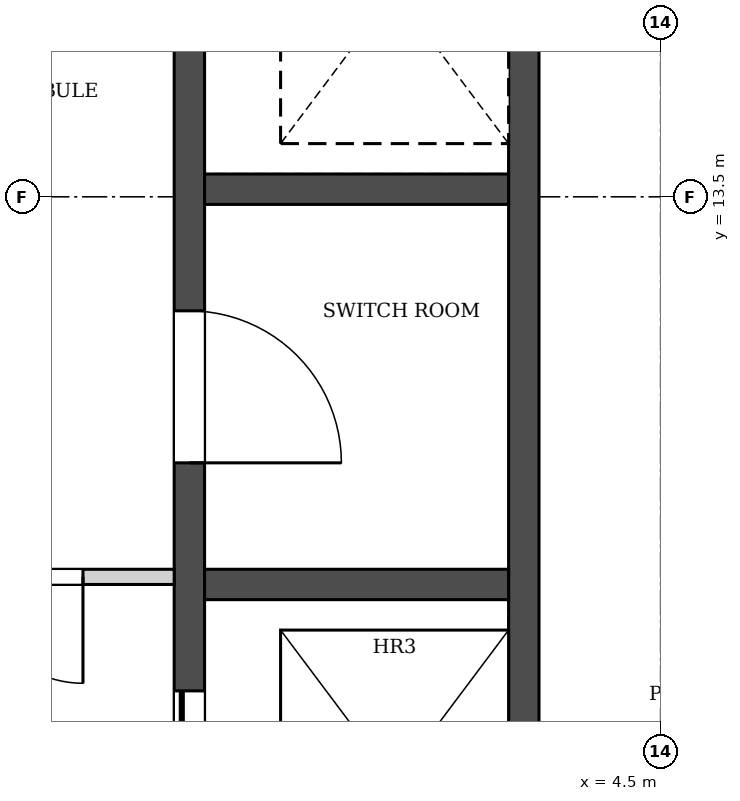
"""IFC4 building model, lengths in metres.
Left out: names, types, materials, properties, quantities, classifications, styles, units other than length and angle.
Written with IfcOpenShell. Run it as: python <this file> out.ifc"""

import sys

from ifc_helpers import new_model, si_unit, direction, frame, frame_2d, origin, place, context, subcontext, project, spatial, rectangle, extrude, element, fill, save


model = new_model("IFC4")
c1 = context("Model", 3, precision=1e-05, world=origin(), true_north=direction((0.0, 1.0)))
c2 = subcontext(c1, "Body", "Model", "MODEL_VIEW")
j1 = project(units=[si_unit("LENGTHUNIT", "METRE"), si_unit("PLANEANGLEUNIT", "RADIAN")], contexts=[c1])
p1 = place(None, origin())
s1 = spatial("IfcSite", under=j1, at=p1, CompositionType="ELEMENT")
p2 = place(p1, origin())
s2 = spatial("IfcBuilding", under=s1, at=p2, CompositionType="ELEMENT")
p3 = place(p2, frame((0.0, 0.0, 304.5)))
s3 = spatial("IfcBuildingStorey", under=s2, at=p3, CompositionType="ELEMENT", Elevation=304.5)
p4 = place(p3, frame((24.905, 7.709, 0.0), z_axis=(0.0, 0.0, 1.0), x_axis=(-0.50000128873, 0.866024659735, 0.0)))
e1 = element("IfcWall", 1, at=p4, inside=s3, PredefinedType="SOLIDWALL", context=c2, shape_type="SweptSolid", body=[
    extrude(rectangle(XDim=41.104, YDim=0.34, at=frame_2d((20.552, 0.0))), origin(), (0.0, 0.0, 1.0), 5.0),
])
p5 = place(p4, frame((3.776, 0.0, 0.9)))
e2 = element("IfcOpeningElement", 2, at=p5, cuts=e1, PredefinedType="OPENING", context=c2, shape_type="SweptSolid", body=[
    extrude(rectangle(XDim=1.885, YDim=3.0, at=frame_2d((0.942, 1.5))), frame((0.0, 0.18, 0.0), z_axis=(0.0, -1.0, 0.0), x_axis=(1.0, 0.0, 0.0)), (0.0, 0.0, 1.0), 0.36),
])
p6 = place(p4, frame((6.776, 0.0, 0.9)))
e3 = element("IfcOpeningElement", 3, at=p6, cuts=e1, PredefinedType="OPENING", context=c2, shape_type="SweptSolid", body=[
    extrude(rectangle(XDim=1.885, YDim=3.0, at=frame_2d((0.942, 1.5))), frame((0.0, 0.18, 0.0), z_axis=(0.0, -1.0, 0.0), x_axis=(1.0, 0.0, 0.0)), (0.0, 0.0, 1.0), 0.36),
])
p7 = place(p4, frame((9.776, 0.0, 0.9)))
e4 = element("IfcOpeningElement", 4, at=p7, cuts=e1, PredefinedType="OPENING", context=c2, shape_type="SweptSolid", body=[
    extrude(rectangle(XDim=1.885, YDim=3.0, at=frame_2d((0.942, 1.5))), frame((0.0, 0.18, 0.0), z_axis=(0.0, -1.0, 0.0), x_axis=(1.0, 0.0, 0.0)), (0.0, 0.0, 1.0), 0.36),
])
p8 = place(p4, frame((12.776, 0.0, 0.9)))
e5 = element("IfcOpeningElement", 5, at=p8, cuts=e1, PredefinedType="OPENING", context=c2, shape_type="SweptSolid", body=[
    extrude(rectangle(XDim=1.885, YDim=3.0, at=frame_2d((0.942, 1.5))), frame((0.0, 0.18, 0.0), z_axis=(0.0, -1.0, 0.0), x_axis=(1.0, 0.0, 0.0)), (0.0, 0.0, 1.0), 0.36),
])
p9 = place(p4, frame((15.776, 0.0, 0.9)))
e6 = element("IfcOpeningElement", 6, at=p9, cuts=e1, PredefinedType="OPENING", context=c2, shape_type="SweptSolid", body=[
    extrude(rectangle(XDim=1.885, YDim=3.0, at=frame_2d((0.942, 1.5))), frame((0.0, 0.18, 0.0), z_axis=(0.0, -1.0, 0.0), x_axis=(1.0, 0.0, 0.0)), (0.0, 0.0, 1.0), 0.36),
])
p10 = place(p4, frame((18.776, 0.0, 0.9)))
e7 = element("IfcOpeningElement", 7, at=p10, cuts=e1, PredefinedType="OPENING", context=c2, shape_type="SweptSolid", body=[
    extrude(rectangle(XDim=1.885, YDim=3.0, at=frame_2d((0.942, 1.5))), frame((0.0, 0.18, 0.0), z_axis=(0.0, -1.0, 0.0), x_axis=(1.0, 0.0, 0.0)), (0.0, 0.0, 1.0), 0.36),
])
p11 = place(p4, frame((21.776, 0.0, 0.9)))
e8 = element("IfcOpeningElement", 8, at=p11, cuts=e1, PredefinedType="OPENING", context=c2, shape_type="SweptSolid", body=[
    extrude(rectangle(XDim=1.885, YDim=3.0, at=frame_2d((0.942, 1.5))), frame((0.0, 0.18, 0.0), z_axis=(0.0, -1.0, 0.0), x_axis=(1.0, 0.0, 0.0)), (0.0, 0.0, 1.0), 0.36),
])
p12 = place(p4, frame((24.776, 0.0, 0.9)))
e9 = element("IfcOpeningElement", 9, at=p12, cuts=e1, PredefinedType="OPENING", context=c2, shape_type="SweptSolid", body=[
    extrude(rectangle(XDim=1.885, YDim=3.0, at=frame_2d((0.942, 1.5))), frame((0.0, 0.18, 0.0), z_axis=(0.0, -1.0, 0.0), x_axis=(1.0, 0.0, 0.0)), (0.0, 0.0, 1.0), 0.36),
])
p13 = place(p4, frame((27.776, 0.0, 0.9)))
e10 = element("IfcOpeningElement", 10, at=p13, cuts=e1, PredefinedType="OPENING", context=c2, shape_type="SweptSolid", body=[
    extrude(rectangle(XDim=1.885, YDim=3.0, at=frame_2d((0.942, 1.5))), frame((0.0, 0.18, 0.0), z_axis=(0.0, -1.0, 0.0), x_axis=(1.0, 0.0, 0.0)), (0.0, 0.0, 1.0), 0.36),
])
p14 = place(p4, frame((30.776, 0.0, 0.9)))
e11 = element("IfcOpeningElement", 11, at=p14, cuts=e1, PredefinedType="OPENING", context=c2, shape_type="SweptSolid", body=[
    extrude(rectangle(XDim=1.885, YDim=3.0, at=frame_2d((0.942, 1.5))), frame((0.0, 0.18, 0.0), z_axis=(0.0, -1.0, 0.0), x_axis=(1.0, 0.0, 0.0)), (0.0, 0.0, 1.0), 0.36),
])
p15 = place(p4, frame((33.776, 0.0, 0.9)))
e12 = element("IfcOpeningElement", 12, at=p15, cuts=e1, PredefinedType="OPENING", context=c2, shape_type="SweptSolid", body=[
    extrude(rectangle(XDim=1.885, YDim=3.0, at=frame_2d((0.942, 1.5))), frame((0.0, 0.18, 0.0), z_axis=(0.0, -1.0, 0.0), x_axis=(1.0, 0.0, 0.0)), (0.0, 0.0, 1.0), 0.36),
])
p16 = place(p4, frame((36.776, 0.0, 0.9)))
e13 = element("IfcOpeningElement", 13, at=p16, cuts=e1, PredefinedType="OPENING", context=c2, shape_type="SweptSolid", body=[
    extrude(rectangle(XDim=1.885, YDim=3.0, at=frame_2d((0.942, 1.5))), frame((0.0, 0.18, 0.0), z_axis=(0.0, -1.0, 0.0), x_axis=(1.0, 0.0, 0.0)), (0.0, 0.0, 1.0), 0.36),
])
p17 = place(p3, frame((3.6, 8.45, -0.4), z_axis=(0.0, 0.0, 1.0), x_axis=(0.0, 1.0, 0.0)))
e14 = element("IfcWall", 14, at=p17, inside=s3, PredefinedType="SOLIDWALL", context=c2, shape_type="SweptSolid", body=[
    extrude(rectangle(XDim=7.8, YDim=0.2, at=frame_2d((3.9, 0.0))), origin(), (0.0, 0.0, 1.0), 5.4),
])
p18 = place(p3, frame((1.4, 5.85, -0.4), z_axis=(0.0, 0.0, 1.0), x_axis=(0.0, 1.0, 0.0)))
e15 = element("IfcWall", 15, at=p18, inside=s3, PredefinedType="SOLIDWALL", context=c2, shape_type="SweptSolid", body=[
    extrude(rectangle(XDim=11.75, YDim=0.2, at=frame_2d((5.875, 0.0))), origin(), (0.0, 0.0, 1.0), 5.4),
])
p19 = place(p18, frame((3.2, 0.0, 0.4)))
e16 = element("IfcOpeningElement", 16, at=p19, cuts=e15, PredefinedType="OPENING", context=c2, shape_type="SweptSolid", body=[
    extrude(rectangle(XDim=1.2, YDim=2.1, at=frame_2d((0.6, 1.05))), frame((0.0, 0.11, 0.0), z_axis=(0.0, -1.0, 0.0), x_axis=(1.0, 0.0, 0.0)), (0.0, 0.0, 1.0), 0.22),
])
p20 = place(p18, frame((0.65, 0.0, 0.4)))
e17 = element("IfcOpeningElement", 17, at=p20, cuts=e15, PredefinedType="OPENING", context=c2, shape_type="SweptSolid", body=[
    extrude(rectangle(XDim=1.1, YDim=2.1, at=frame_2d((0.55, 1.05))), frame((0.0, 0.11, 0.0), z_axis=(0.0, -1.0, 0.0), x_axis=(1.0, 0.0, 0.0)), (0.0, 0.0, 1.0), 0.22),
])
p21 = place(p18, frame((5.9, 0.0, 0.4)))
e18 = element("IfcOpeningElement", 18, at=p21, cuts=e15, PredefinedType="OPENING", context=c2, shape_type="SweptSolid", body=[
    extrude(rectangle(XDim=1.0, YDim=2.1, at=frame_2d((0.5, 1.05))), frame((0.0, 0.11, 0.0), z_axis=(0.0, -1.0, 0.0), x_axis=(1.0, 0.0, 0.0)), (0.0, 0.0, 1.0), 0.22),
])
for number, where, z_axis, x_axis in (
    (19, (1.5, 10.95, -0.4), (0.0, 0.0, 1.0), (1.0, 0.0, 0.0)),
    (20, (1.5, 13.55, -0.4), (0.0, 0.0, 1.0), (1.0, 0.0, 0.0)),
):
    element("IfcWall", number, at=place(p3, frame(where, z_axis=z_axis, x_axis=x_axis)), inside=s3, PredefinedType="SOLIDWALL", context=c2, shape_type="SweptSolid", body=[
        extrude(rectangle(XDim=2.0, YDim=0.2, at=frame_2d((1.0, 0.0))), origin(), (0.0, 0.0, 1.0), 5.4),
    ])
p22 = place(p3, frame((-1.3, 11.0, 0.0), z_axis=(0.0, 0.0, 1.0), x_axis=(1.0, 0.0, 0.0)))
e21 = element("IfcWall", 21, at=p22, inside=s3, PredefinedType="PARTITIONING", context=c2, shape_type="SweptSolid", body=[
    extrude(rectangle(XDim=2.6, YDim=0.1, at=frame_2d((1.3, 0.0))), origin(), (0.0, 0.0, 1.0), 5.0),
])
p23 = place(p22, frame((0.6, 0.0, 0.0)))
e22 = element("IfcOpeningElement", 22, at=p23, cuts=e21, PredefinedType="OPENING", context=c2, shape_type="SweptSolid", body=[
    extrude(rectangle(XDim=1.4, YDim=2.1, at=frame_2d((0.7, 1.05))), frame((0.0, 0.06, 0.0), z_axis=(0.0, -1.0, 0.0), x_axis=(1.0, 0.0, 0.0)), (0.0, 0.0, 1.0), 0.12),
])
p24 = place(p19, origin())
e23 = element("IfcDoor", 23, at=p24, inside=s3, OperationType="SLIDING_TO_LEFT", PredefinedType="DOOR", context=c2, shape_type="SweptSolid", body=[
    extrude(rectangle(XDim=1.2, YDim=2.1, at=frame_2d((0.6, 1.05))), frame((0.0, 0.025, 0.0), z_axis=(0.0, -1.0, 0.0), x_axis=(1.0, 0.0, 0.0)), (0.0, 0.0, 1.0), 0.05),
])
fill(e16, e23)
p25 = place(p21, frame((1.0, 0.0, 0.0), z_axis=(0.0, 0.0, 1.0), x_axis=(-1.0, 0.0, 0.0)))
e24 = element("IfcDoor", 24, at=p25, inside=s3, OperationType="SINGLE_SWING_RIGHT", PredefinedType="DOOR", context=c2, shape_type="SweptSolid", body=[
    extrude(rectangle(XDim=1.0, YDim=2.1, at=frame_2d((0.5, 1.05))), frame((0.0, 0.025, 0.0), z_axis=(0.0, -1.0, 0.0), x_axis=(1.0, 0.0, 0.0)), (0.0, 0.0, 1.0), 0.05),
])
fill(e18, e24)
p26 = place(p23, frame((1.4, 0.0, 0.0), z_axis=(0.0, 0.0, 1.0), x_axis=(-1.0, 0.0, 0.0)))
e25 = element("IfcDoor", 25, at=p26, inside=s3, OperationType="DOUBLE_DOOR_SINGLE_SWING", PredefinedType="DOOR", context=c2, shape_type="SweptSolid", body=[
    extrude(rectangle(XDim=1.4, YDim=2.1, at=frame_2d((0.7, 1.05))), frame((0.0, 0.025, 0.0), z_axis=(0.0, -1.0, 0.0), x_axis=(1.0, 0.0, 0.0)), (0.0, 0.0, 1.0), 0.05),
])
fill(e22, e25)
save(model, sys.argv[1])
